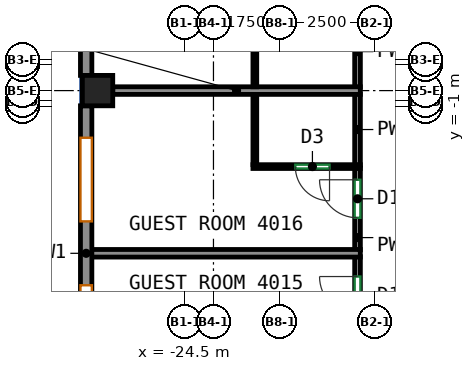
"""IFC4 building model, lengths in metres.
Left out: names, types, materials, properties, quantities, classifications, styles, units other than length and angle.
Written with IfcOpenShell. Run it as: python <this file> out.ifc"""

import sys

from ifc_helpers import new_model, si_unit, direction, frame, frame_2d, origin, origin_2d, place, context, subcontext, project, spatial, rectangle, extrude, source, transform, mapped, element, fill, save


model = new_model("IFC4")
c1 = context("Model", 3, precision=1e-05, world=origin(), true_north=direction((0.0, 1.0)))
c2 = subcontext(c1, "Body", "Model", "MODEL_VIEW")
j1 = project(units=[si_unit("LENGTHUNIT", "METRE"), si_unit("PLANEANGLEUNIT", "RADIAN")], contexts=[c1])
p1 = place(None, origin())
s1 = spatial("IfcSite", under=j1, at=p1, CompositionType="ELEMENT")
p2 = place(p1, origin())
s2 = spatial("IfcBuilding", under=s1, at=p2, CompositionType="ELEMENT")
p3 = place(p2, frame((0.0, 0.0, 171.9)))
s3 = spatial("IfcBuildingStorey", under=s2, at=p3, CompositionType="ELEMENT", Elevation=171.9)
m1 = source(origin(), c2, "Body", "SweptSolid", [
    extrude(rectangle(XDim=0.8, YDim=0.8, at=origin_2d()), origin(), (0.0, 0.0, 1.0), 3.12),
])
p4 = place(p3, frame((-26.8, -0.562, 0.0), z_axis=(0.0, 0.0, 1.0), x_axis=(1.0, 0.0, 0.0)))
e1 = element("IfcColumn", 1, at=p4, inside=s3, PredefinedType="COLUMN", context=c2, shape_type="MappedRepresentation", body=[
    mapped(m1, transform((0.0, 0.0, 0.0))),
])
m2 = source(origin(), c2, "Body", "SweptSolid", [
    extrude(rectangle(XDim=7.763, YDim=0.3, at=frame_2d((3.881, 0.0))), origin(), (0.0, 0.0, 1.0), 3.12),
])
p5 = place(p3, frame((-27.1, 7.6, 0.0), z_axis=(0.0, 0.0, 1.0), x_axis=(0.0, -1.0, 0.0)))
e2 = element("IfcWall", 2, at=p5, inside=s3, PredefinedType="SOLIDWALL", context=c2, shape_type="MappedRepresentation", body=[
    mapped(m2, transform((0.0, 0.0, 0.0))),
])
p6 = place(p5, frame((0.841, 0.0, 0.85)))
e3 = element("IfcOpeningElement", 3, at=p6, cuts=e2, PredefinedType="OPENING", context=c2, shape_type="SweptSolid", body=[
    extrude(rectangle(XDim=2.2, YDim=1.95, at=frame_2d((1.1, 0.975))), frame((0.0, 0.16, 0.0), z_axis=(0.0, -1.0, 0.0), x_axis=(1.0, 0.0, 0.0)), (0.0, 0.0, 1.0), 0.32),
])
p7 = place(p5, frame((4.722, 0.0, 0.85)))
e4 = element("IfcOpeningElement", 4, at=p7, cuts=e2, PredefinedType="OPENING", context=c2, shape_type="SweptSolid", body=[
    extrude(rectangle(XDim=2.2, YDim=1.95, at=frame_2d((1.1, 0.975))), frame((0.0, 0.16, 0.0), z_axis=(0.0, -1.0, 0.0), x_axis=(1.0, 0.0, 0.0)), (0.0, 0.0, 1.0), 0.32),
])
p8 = place(p3, frame((-27.1, -0.962, 0.0), z_axis=(0.0, 0.0, 1.0), x_axis=(0.0, -1.0, 0.0)))
e5 = element("IfcWall", 5, at=p8, inside=s3, PredefinedType="SOLIDWALL", context=c2, shape_type="MappedRepresentation", body=[
    mapped(m2, transform((0.0, 0.0, 0.0))),
])
p9 = place(p8, frame((0.841, 0.0, 0.85)))
e6 = element("IfcOpeningElement", 6, at=p9, cuts=e5, PredefinedType="OPENING", context=c2, shape_type="SweptSolid", body=[
    extrude(rectangle(XDim=2.2, YDim=1.95, at=frame_2d((1.1, 0.975))), frame((0.0, 0.16, 0.0), z_axis=(0.0, -1.0, 0.0), x_axis=(1.0, 0.0, 0.0)), (0.0, 0.0, 1.0), 0.32),
])
p10 = place(p8, frame((4.722, 0.0, 0.85)))
e7 = element("IfcOpeningElement", 7, at=p10, cuts=e5, PredefinedType="OPENING", context=c2, shape_type="SweptSolid", body=[
    extrude(rectangle(XDim=2.2, YDim=1.95, at=frame_2d((1.1, 0.975))), frame((0.0, 0.16, 0.0), z_axis=(0.0, -1.0, 0.0), x_axis=(1.0, 0.0, 0.0)), (0.0, 0.0, 1.0), 0.32),
])
p11 = place(p3, frame((-19.959, -7.085, 0.0), z_axis=(0.0, 0.0, 1.0), x_axis=(0.0, 1.0, 0.0)))
e8 = element("IfcWall", 8, at=p11, inside=s3, PredefinedType="PARTITIONING", context=c2, shape_type="SweptSolid", body=[
    extrude(rectangle(XDim=2.152, YDim=0.15, at=frame_2d((1.076, 0.0))), origin(), (0.0, 0.0, 1.0), 3.12),
])
p12 = place(p11, frame((0.63, 0.0, 0.0)))
e9 = element("IfcOpeningElement", 9, at=p12, cuts=e8, PredefinedType="OPENING", context=c2, shape_type="SweptSolid", body=[
    extrude(rectangle(XDim=1.0, YDim=2.1, at=frame_2d((0.5, 1.05))), frame((0.0, 0.085, 0.0), z_axis=(0.0, -1.0, 0.0), x_axis=(1.0, 0.0, 0.0)), (0.0, 0.0, 1.0), 0.17),
])
p13 = place(p3, frame((-19.959, -4.753, 0.0), z_axis=(0.0, 0.0, 1.0), x_axis=(0.0, 1.0, 0.0)))
e10 = element("IfcWall", 10, at=p13, inside=s3, PredefinedType="PARTITIONING", context=c2, shape_type="SweptSolid", body=[
    extrude(rectangle(XDim=2.151, YDim=0.15, at=frame_2d((1.075, 0.0))), origin(), (0.0, 0.0, 1.0), 3.12),
])
p14 = place(p13, frame((0.844, 0.0, 0.0)))
e11 = element("IfcOpeningElement", 11, at=p14, cuts=e10, PredefinedType="OPENING", context=c2, shape_type="SweptSolid", body=[
    extrude(rectangle(XDim=1.0, YDim=2.1, at=frame_2d((0.5, 1.05))), frame((0.0, 0.085, 0.0), z_axis=(0.0, -1.0, 0.0), x_axis=(1.0, 0.0, 0.0)), (0.0, 0.0, 1.0), 0.17),
])
for number, where, z_axis, x_axis in (
    (12, (-19.959, -2.522, 0.0), (0.0, 0.0, 1.0), (0.0, 1.0, 0.0)),
    (13, (-19.959, -0.472, 0.0), (0.0, 0.0, 1.0), (0.0, 1.0, 0.0)),
):
    element("IfcWall", number, at=place(p3, frame(where, z_axis=z_axis, x_axis=x_axis)), inside=s3, PredefinedType="PARTITIONING", context=c2, shape_type="SweptSolid", body=[
        extrude(rectangle(XDim=1.87, YDim=0.15, at=frame_2d((0.935, 0.0))), origin(), (0.0, 0.0, 1.0), 3.12),
    ])
p15 = place(p3, frame((-27.0, -4.843, 0.0), z_axis=(0.0, 0.0, 1.0), x_axis=(1.0, 0.0, 0.0)))
e14 = element("IfcWall", 14, at=p15, inside=s3, PredefinedType="PARTITIONING", context=c2, shape_type="SweptSolid", body=[
    extrude(rectangle(XDim=7.114, YDim=0.2, at=frame_2d((3.557, 0.0))), origin(), (0.0, 0.0, 1.0), 3.12),
])
p16 = place(p3, frame((-19.886, -2.562, 0.0), z_axis=(0.0, 0.0, 1.0), x_axis=(-1.0, 0.0, 0.0)))
e15 = element("IfcWall", 15, at=p16, inside=s3, PredefinedType="PARTITIONING", context=c2, shape_type="SweptSolid", body=[
    extrude(rectangle(XDim=2.825, YDim=0.1, at=frame_2d((1.413, 0.0))), origin(), (0.0, 0.0, 1.0), 3.12),
])
p17 = place(p16, frame((0.81, 0.0, 0.0)))
e16 = element("IfcOpeningElement", 16, at=p17, cuts=e15, PredefinedType="OPENING", context=c2, shape_type="SweptSolid", body=[
    extrude(rectangle(XDim=0.9, YDim=2.1, at=frame_2d((0.45, 1.05))), frame((0.0, 0.06, 0.0), z_axis=(0.0, -1.0, 0.0), x_axis=(1.0, 0.0, 0.0)), (0.0, 0.0, 1.0), 0.12),
])
p18 = place(p3, frame((-22.661, -2.512, 0.0), z_axis=(0.0, 0.0, 1.0), x_axis=(0.0, 1.0, 0.0)))
e17 = element("IfcWall", 17, at=p18, inside=s3, PredefinedType="PARTITIONING", context=c2, shape_type="SweptSolid", body=[
    extrude(rectangle(XDim=1.85, YDim=0.1, at=frame_2d((0.925, 0.0))), origin(), (0.0, 0.0, 1.0), 3.12),
])
p19 = place(p3, frame((-26.4, -0.562, 0.0), z_axis=(0.0, 0.0, 1.0), x_axis=(1.0, 0.0, 0.0)))
e18 = element("IfcWall", 18, at=p19, inside=s3, PredefinedType="PARTITIONING", context=c2, shape_type="SweptSolid", body=[
    extrude(rectangle(XDim=6.514, YDim=0.2, at=frame_2d((3.257, 0.0))), origin(), (0.0, 0.0, 1.0), 2.52),
])
p20 = place(p3, frame((-22.661, -0.462, 0.0), z_axis=(0.0, 0.0, 1.0), x_axis=(0.0, 1.0, 0.0)))
e19 = element("IfcWall", 19, at=p20, inside=s3, PredefinedType="PARTITIONING", context=c2, shape_type="SweptSolid", body=[
    extrude(rectangle(XDim=1.85, YDim=0.1, at=frame_2d((0.925, 0.0))), origin(), (0.0, 0.0, 1.0), 3.12),
])
p21 = place(p9, origin())
e20 = element("IfcWindow", 20, at=p21, inside=s3, PartitioningType="SINGLE_PANEL", PredefinedType="WINDOW", context=c2, shape_type="SweptSolid", body=[
    extrude(rectangle(XDim=2.2, YDim=1.95, at=frame_2d((1.1, 0.975))), frame((0.0, 0.03, 0.0), z_axis=(0.0, -1.0, 0.0), x_axis=(1.0, 0.0, 0.0)), (0.0, 0.0, 1.0), 0.06),
])
fill(e6, e20)
p22 = place(p10, origin())
e21 = element("IfcWindow", 21, at=p22, inside=s3, PartitioningType="SINGLE_PANEL", PredefinedType="WINDOW", context=c2, shape_type="SweptSolid", body=[
    extrude(rectangle(XDim=2.2, YDim=1.95, at=frame_2d((1.1, 0.975))), frame((0.0, 0.03, 0.0), z_axis=(0.0, -1.0, 0.0), x_axis=(1.0, 0.0, 0.0)), (0.0, 0.0, 1.0), 0.06),
])
fill(e7, e21)
p23 = place(p12, origin())
e22 = element("IfcDoor", 22, at=p23, inside=s3, OperationType="SINGLE_SWING_RIGHT", PredefinedType="DOOR", context=c2, shape_type="SweptSolid", body=[
    extrude(rectangle(XDim=1.0, YDim=2.1, at=frame_2d((0.5, 1.05))), frame((0.0, 0.025, 0.0), z_axis=(0.0, -1.0, 0.0), x_axis=(1.0, 0.0, 0.0)), (0.0, 0.0, 1.0), 0.05),
])
fill(e9, e22)
p24 = place(p14, origin())
e23 = element("IfcDoor", 23, at=p24, inside=s3, OperationType="SINGLE_SWING_RIGHT", PredefinedType="DOOR", context=c2, shape_type="SweptSolid", body=[
    extrude(rectangle(XDim=1.0, YDim=2.1, at=frame_2d((0.5, 1.05))), frame((0.0, 0.025, 0.0), z_axis=(0.0, -1.0, 0.0), x_axis=(1.0, 0.0, 0.0)), (0.0, 0.0, 1.0), 0.05),
])
fill(e11, e23)
p25 = place(p17, origin())
e24 = element("IfcDoor", 24, at=p25, inside=s3, OperationType="SINGLE_SWING_LEFT", PredefinedType="DOOR", context=c2, shape_type="SweptSolid", body=[
    extrude(rectangle(XDim=0.9, YDim=2.1, at=frame_2d((0.45, 1.05))), frame((0.0, 0.025, 0.0), z_axis=(0.0, -1.0, 0.0), x_axis=(1.0, 0.0, 0.0)), (0.0, 0.0, 1.0), 0.05),
])
fill(e16, e24)
save(model, sys.argv[1])
